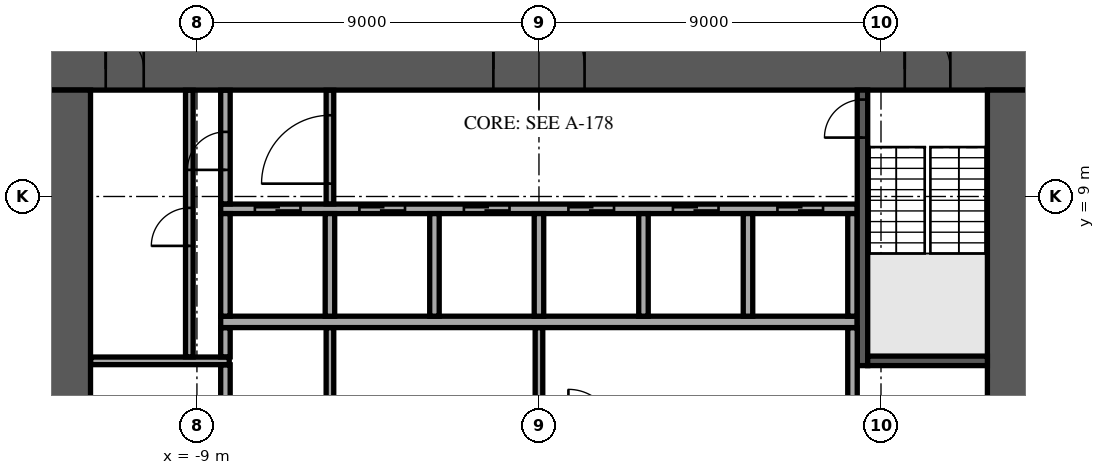
"""IFC4 building model, lengths in metres.
Left out: names, types, materials, properties, quantities, classifications, styles, units other than length and angle.
Written with IfcOpenShell. Run it as: python <this file> out.ifc"""

import sys

from ifc_helpers import new_model, si_unit, direction, frame, frame_2d, origin, place, context, subcontext, project, spatial, rectangle, extrude, element, fill, save


model = new_model("IFC4")
c1 = context("Model", 3, precision=1e-05, world=origin(), true_north=direction((0.0, 1.0)))
c2 = subcontext(c1, "Body", "Model", "MODEL_VIEW")
j1 = project(units=[si_unit("LENGTHUNIT", "METRE"), si_unit("PLANEANGLEUNIT", "RADIAN")], contexts=[c1])
p1 = place(None, origin())
s1 = spatial("IfcSite", under=j1, at=p1, CompositionType="ELEMENT")
p2 = place(p1, origin())
s2 = spatial("IfcBuilding", under=s1, at=p2, CompositionType="ELEMENT")
p3 = place(p2, frame((0.0, 0.0, 102.1)))
s3 = spatial("IfcBuildingStorey", under=s2, at=p3, CompositionType="ELEMENT", Elevation=102.1)
p4 = place(p3, frame((-12.9, 12.35, 0.0), z_axis=(0.0, 0.0, 1.0), x_axis=(1.0, 0.0, 0.0)))
e1 = element("IfcWall", 1, at=p4, inside=s3, PredefinedType="SHEAR", context=c2, shape_type="SweptSolid", body=[
    extrude(rectangle(XDim=25.8, YDim=1.1, at=frame_2d((12.9, 0.0))), origin(), (0.0, 0.0, 1.0), 3.58),
])
p5 = place(p4, frame((11.7, 0.0, 0.0)))
e2 = element("IfcOpeningElement", 2, at=p5, cuts=e1, PredefinedType="OPENING", context=c2, shape_type="SweptSolid", body=[
    extrude(rectangle(XDim=2.4, YDim=2.4, at=frame_2d((1.2, 1.2))), frame((0.0, 0.56, 0.0), z_axis=(0.0, -1.0, 0.0), x_axis=(1.0, 0.0, 0.0)), (0.0, 0.0, 1.0), 1.12),
])
p6 = place(p4, frame((22.525, 0.0, 0.0)))
e3 = element("IfcOpeningElement", 3, at=p6, cuts=e1, PredefinedType="OPENING", context=c2, shape_type="SweptSolid", body=[
    extrude(rectangle(XDim=1.2, YDim=2.1, at=frame_2d((0.6, 1.05))), frame((0.0, 0.56, 0.0), z_axis=(0.0, -1.0, 0.0), x_axis=(1.0, 0.0, 0.0)), (0.0, 0.0, 1.0), 1.12),
])
p7 = place(p4, frame((1.5, 0.0, 0.0)))
e4 = element("IfcOpeningElement", 4, at=p7, cuts=e1, PredefinedType="OPENING", context=c2, shape_type="SweptSolid", body=[
    extrude(rectangle(XDim=1.0, YDim=2.1, at=frame_2d((0.5, 1.05))), frame((0.0, 0.56, 0.0), z_axis=(0.0, -1.0, 0.0), x_axis=(1.0, 0.0, 0.0)), (0.0, 0.0, 1.0), 1.12),
])
p8 = place(p3, frame((12.35, -11.8, 0.0), z_axis=(0.0, 0.0, 1.0), x_axis=(0.0, 1.0, 0.0)))
e5 = element("IfcWall", 5, at=p8, inside=s3, PredefinedType="SHEAR", context=c2, shape_type="SweptSolid", body=[
    extrude(rectangle(XDim=23.6, YDim=1.1, at=frame_2d((11.8, 0.0))), origin(), (0.0, 0.0, 1.0), 3.58),
])
p9 = place(p8, frame((10.6, 0.0, 0.0)))
e6 = element("IfcOpeningElement", 6, at=p9, cuts=e5, PredefinedType="OPENING", context=c2, shape_type="SweptSolid", body=[
    extrude(rectangle(XDim=2.4, YDim=2.4, at=frame_2d((1.2, 1.2))), frame((0.0, 0.56, 0.0), z_axis=(0.0, -1.0, 0.0), x_axis=(1.0, 0.0, 0.0)), (0.0, 0.0, 1.0), 1.12),
])
p10 = place(p3, frame((-12.35, -11.8, 0.0), z_axis=(0.0, 0.0, 1.0), x_axis=(0.0, 1.0, 0.0)))
e7 = element("IfcWall", 7, at=p10, inside=s3, PredefinedType="SHEAR", context=c2, shape_type="SweptSolid", body=[
    extrude(rectangle(XDim=23.6, YDim=1.1, at=frame_2d((11.8, 0.0))), origin(), (0.0, 0.0, 1.0), 3.58),
])
p11 = place(p10, frame((10.6, 0.0, 0.0)))
e8 = element("IfcOpeningElement", 8, at=p11, cuts=e7, PredefinedType="OPENING", context=c2, shape_type="SweptSolid", body=[
    extrude(rectangle(XDim=2.4, YDim=2.4, at=frame_2d((1.2, 1.2))), frame((0.0, 0.56, 0.0), z_axis=(0.0, -1.0, 0.0), x_axis=(1.0, 0.0, 0.0)), (0.0, 0.0, 1.0), 1.12),
])
p12 = place(p3, frame((-8.375, 5.7, 0.0), z_axis=(0.0, 0.0, 1.0), x_axis=(1.0, 0.0, 0.0)))
e9 = element("IfcWall", 9, at=p12, inside=s3, PredefinedType="SOLIDWALL", context=c2, shape_type="SweptSolid", body=[
    extrude(rectangle(XDim=16.75, YDim=0.3, at=frame_2d((8.375, 0.0))), origin(), (0.0, 0.0, 1.0), 3.58),
])
p13 = place(p3, frame((-8.375, 8.675, 0.0), z_axis=(0.0, 0.0, 1.0), x_axis=(1.0, 0.0, 0.0)))
e10 = element("IfcWall", 10, at=p13, inside=s3, PredefinedType="SOLIDWALL", context=c2, shape_type="SweptSolid", body=[
    extrude(rectangle(XDim=16.75, YDim=0.25, at=frame_2d((8.375, 0.0))), origin(), (0.0, 0.0, 1.0), 3.58),
])
p14 = place(p13, frame((0.9, 0.0, 0.0)))
e11 = element("IfcOpeningElement", 11, at=p14, cuts=e10, PredefinedType="OPENING", context=c2, shape_type="SweptSolid", body=[
    extrude(rectangle(XDim=1.2, YDim=2.1, at=frame_2d((0.6, 1.05))), frame((0.0, 0.135, 0.0), z_axis=(0.0, -1.0, 0.0), x_axis=(1.0, 0.0, 0.0)), (0.0, 0.0, 1.0), 0.27),
])
p15 = place(p13, frame((3.65, 0.0, 0.0)))
e12 = element("IfcOpeningElement", 12, at=p15, cuts=e10, PredefinedType="OPENING", context=c2, shape_type="SweptSolid", body=[
    extrude(rectangle(XDim=1.2, YDim=2.1, at=frame_2d((0.6, 1.05))), frame((0.0, 0.135, 0.0), z_axis=(0.0, -1.0, 0.0), x_axis=(1.0, 0.0, 0.0)), (0.0, 0.0, 1.0), 0.27),
])
p16 = place(p13, frame((6.4, 0.0, 0.0)))
e13 = element("IfcOpeningElement", 13, at=p16, cuts=e10, PredefinedType="OPENING", context=c2, shape_type="SweptSolid", body=[
    extrude(rectangle(XDim=1.2, YDim=2.1, at=frame_2d((0.6, 1.05))), frame((0.0, 0.135, 0.0), z_axis=(0.0, -1.0, 0.0), x_axis=(1.0, 0.0, 0.0)), (0.0, 0.0, 1.0), 0.27),
])
p17 = place(p13, frame((9.15, 0.0, 0.0)))
e14 = element("IfcOpeningElement", 14, at=p17, cuts=e10, PredefinedType="OPENING", context=c2, shape_type="SweptSolid", body=[
    extrude(rectangle(XDim=1.2, YDim=2.1, at=frame_2d((0.6, 1.05))), frame((0.0, 0.135, 0.0), z_axis=(0.0, -1.0, 0.0), x_axis=(1.0, 0.0, 0.0)), (0.0, 0.0, 1.0), 0.27),
])
p18 = place(p13, frame((11.9, 0.0, 0.0)))
e15 = element("IfcOpeningElement", 15, at=p18, cuts=e10, PredefinedType="OPENING", context=c2, shape_type="SweptSolid", body=[
    extrude(rectangle(XDim=1.2, YDim=2.1, at=frame_2d((0.6, 1.05))), frame((0.0, 0.135, 0.0), z_axis=(0.0, -1.0, 0.0), x_axis=(1.0, 0.0, 0.0)), (0.0, 0.0, 1.0), 0.27),
])
p19 = place(p13, frame((14.65, 0.0, 0.0)))
e16 = element("IfcOpeningElement", 16, at=p19, cuts=e10, PredefinedType="OPENING", context=c2, shape_type="SweptSolid", body=[
    extrude(rectangle(XDim=1.2, YDim=2.1, at=frame_2d((0.6, 1.05))), frame((0.0, 0.135, 0.0), z_axis=(0.0, -1.0, 0.0), x_axis=(1.0, 0.0, 0.0)), (0.0, 0.0, 1.0), 0.27),
])
for number, where, z_axis, x_axis in (
    (17, (-8.25, 5.85, 0.0), (0.0, 0.0, 1.0), (0.0, 1.0, 0.0)),
    (18, (-5.5, 5.85, 0.0), (0.0, 0.0, 1.0), (0.0, 1.0, 0.0)),
    (19, (-2.75, 5.85, 0.0), (0.0, 0.0, 1.0), (0.0, 1.0, 0.0)),
    (20, (0.0, 5.85, 0.0), (0.0, 0.0, 1.0), (0.0, 1.0, 0.0)),
    (21, (2.75, 5.85, 0.0), (0.0, 0.0, 1.0), (0.0, 1.0, 0.0)),
    (22, (5.5, 5.85, 0.0), (0.0, 0.0, 1.0), (0.0, 1.0, 0.0)),
    (23, (8.25, 5.85, 0.0), (0.0, 0.0, 1.0), (0.0, 1.0, 0.0)),
):
    element("IfcWall", number, at=place(p3, frame(where, z_axis=z_axis, x_axis=x_axis)), inside=s3, PredefinedType="SOLIDWALL", context=c2, shape_type="SweptSolid", body=[
        extrude(rectangle(XDim=2.7, YDim=0.25, at=frame_2d((1.35, 0.0))), origin(), (0.0, 0.0, 1.0), 3.58),
    ])
p20 = place(p3, frame((8.512, 4.55, 0.0), z_axis=(0.0, 0.0, 1.0), x_axis=(0.0, 1.0, 0.0)))
e24 = element("IfcWall", 24, at=p20, inside=s3, PredefinedType="SOLIDWALL", context=c2, shape_type="SweptSolid", body=[
    extrude(rectangle(XDim=7.25, YDim=0.275, at=frame_2d((3.625, 0.0))), origin(), (0.0, 0.0, 1.0), 3.58),
])
p21 = place(p20, frame((6.0, 0.0, 0.0)))
e25 = element("IfcOpeningElement", 25, at=p21, cuts=e24, PredefinedType="OPENING", context=c2, shape_type="SweptSolid", body=[
    extrude(rectangle(XDim=1.0, YDim=2.1, at=frame_2d((0.5, 1.05))), frame((0.0, 0.147, 0.0), z_axis=(0.0, -1.0, 0.0), x_axis=(1.0, 0.0, 0.0)), (0.0, 0.0, 1.0), 0.295),
])
p22 = place(p3, frame((8.65, 4.675, 0.0), z_axis=(0.0, 0.0, 1.0), x_axis=(1.0, 0.0, 0.0)))
e26 = element("IfcWall", 26, at=p22, inside=s3, PredefinedType="SOLIDWALL", context=c2, shape_type="SweptSolid", body=[
    extrude(rectangle(XDim=3.15, YDim=0.25, at=frame_2d((1.575, 0.0))), origin(), (0.0, 0.0, 1.0), 3.58),
])
p23 = place(p3, frame((-8.25, 2.855, 0.0), z_axis=(0.0, 0.0, 1.0), x_axis=(0.0, 1.0, 0.0)))
e27 = element("IfcWall", 27, at=p23, inside=s3, PredefinedType="PARTITIONING", context=c2, shape_type="SweptSolid", body=[
    extrude(rectangle(XDim=1.715, YDim=0.25, at=frame_2d((0.857, 0.0))), origin(), (0.0, 0.0, 1.0), 3.58),
])
for number, where, z_axis, x_axis in (
    (28, (-5.5, 2.855, 0.0), (0.0, 0.0, 1.0), (0.0, 1.0, 0.0)),
    (29, (0.0, 2.855, 0.0), (0.0, 0.0, 1.0), (0.0, 1.0, 0.0)),
):
    element("IfcWall", number, at=place(p3, frame(where, z_axis=z_axis, x_axis=x_axis)), inside=s3, PredefinedType="PARTITIONING", context=c2, shape_type="SweptSolid", body=[
        extrude(rectangle(XDim=2.69, YDim=0.2, at=frame_2d((1.345, 0.0))), origin(), (0.0, 0.0, 1.0), 3.58),
    ])
p24 = place(p3, frame((8.25, 2.855, 0.0), z_axis=(0.0, 0.0, 1.0), x_axis=(0.0, 1.0, 0.0)))
e30 = element("IfcWall", 30, at=p24, inside=s3, PredefinedType="PARTITIONING", context=c2, shape_type="SweptSolid", body=[
    extrude(rectangle(XDim=2.69, YDim=0.25, at=frame_2d((1.345, 0.0))), origin(), (0.0, 0.0, 1.0), 3.58),
])
p25 = place(p3, frame((-11.795, 4.675, 0.0), z_axis=(0.0, 0.0, 1.0), x_axis=(1.0, 0.0, 0.0)))
e31 = element("IfcWall", 31, at=p25, inside=s3, PredefinedType="PARTITIONING", context=c2, shape_type="SweptSolid", body=[
    extrude(rectangle(XDim=3.645, YDim=0.2, at=frame_2d((1.823, 0.0))), origin(), (0.0, 0.0, 1.0), 3.58),
])
p26 = place(p3, frame((-9.2, 4.78, 0.0), z_axis=(0.0, 0.0, 1.0), x_axis=(0.0, 1.0, 0.0)))
e32 = element("IfcWall", 32, at=p26, inside=s3, PredefinedType="PARTITIONING", context=c2, shape_type="SweptSolid", body=[
    extrude(rectangle(XDim=7.015, YDim=0.2, at=frame_2d((3.507, 0.0))), origin(), (0.0, 0.0, 1.0), 3.58),
])
p27 = place(p26, frame((2.92, 0.0, 0.0)))
e33 = element("IfcOpeningElement", 33, at=p27, cuts=e32, PredefinedType="OPENING", context=c2, shape_type="SweptSolid", body=[
    extrude(rectangle(XDim=1.0, YDim=2.1, at=frame_2d((0.5, 1.05))), frame((0.0, 0.11, 0.0), z_axis=(0.0, -1.0, 0.0), x_axis=(1.0, 0.0, 0.0)), (0.0, 0.0, 1.0), 0.22),
])
p28 = place(p3, frame((-8.25, 4.78, 0.0), z_axis=(0.0, 0.0, 1.0), x_axis=(0.0, 1.0, 0.0)))
e34 = element("IfcWall", 34, at=p28, inside=s3, PredefinedType="PARTITIONING", context=c2, shape_type="SweptSolid", body=[
    extrude(rectangle(XDim=0.765, YDim=0.25, at=frame_2d((0.382, 0.0))), origin(), (0.0, 0.0, 1.0), 3.58),
])
p29 = place(p3, frame((-8.25, 8.805, 0.0), z_axis=(0.0, 0.0, 1.0), x_axis=(0.0, 1.0, 0.0)))
e35 = element("IfcWall", 35, at=p29, inside=s3, PredefinedType="PARTITIONING", context=c2, shape_type="SweptSolid", body=[
    extrude(rectangle(XDim=2.99, YDim=0.25, at=frame_2d((1.495, 0.0))), origin(), (0.0, 0.0, 1.0), 3.58),
])
p30 = place(p29, frame((0.895, 0.0, 0.0)))
e36 = element("IfcOpeningElement", 36, at=p30, cuts=e35, PredefinedType="OPENING", context=c2, shape_type="SweptSolid", body=[
    extrude(rectangle(XDim=1.0, YDim=2.1, at=frame_2d((0.5, 1.05))), frame((0.0, 0.135, 0.0), z_axis=(0.0, -1.0, 0.0), x_axis=(1.0, 0.0, 0.0)), (0.0, 0.0, 1.0), 0.27),
])
p31 = place(p3, frame((-5.5, 8.805, 0.0), z_axis=(0.0, 0.0, 1.0), x_axis=(0.0, 1.0, 0.0)))
e37 = element("IfcWall", 37, at=p31, inside=s3, PredefinedType="PARTITIONING", context=c2, shape_type="SweptSolid", body=[
    extrude(rectangle(XDim=2.99, YDim=0.2, at=frame_2d((1.495, 0.0))), origin(), (0.0, 0.0, 1.0), 3.58),
])
p32 = place(p31, frame((0.532, 0.0, 0.0)))
e38 = element("IfcOpeningElement", 38, at=p32, cuts=e37, PredefinedType="OPENING", context=c2, shape_type="SweptSolid", body=[
    extrude(rectangle(XDim=1.8, YDim=2.1, at=frame_2d((0.9, 1.05))), frame((0.0, 0.11, 0.0), z_axis=(0.0, -1.0, 0.0), x_axis=(1.0, 0.0, 0.0)), (0.0, 0.0, 1.0), 0.22),
])
p33 = place(p5, origin())
e39 = element("IfcDoor", 39, at=p33, inside=s3, OperationType="SINGLE_SWING_LEFT", PredefinedType="DOOR", context=c2, shape_type="SweptSolid", body=[
    extrude(rectangle(XDim=2.4, YDim=2.4, at=frame_2d((1.2, 1.2))), frame((0.0, 0.025, 0.0), z_axis=(0.0, -1.0, 0.0), x_axis=(1.0, 0.0, 0.0)), (0.0, 0.0, 1.0), 0.05),
])
fill(e2, e39)
p34 = place(p6, origin())
e40 = element("IfcDoor", 40, at=p34, inside=s3, OperationType="SINGLE_SWING_LEFT", PredefinedType="DOOR", context=c2, shape_type="SweptSolid", body=[
    extrude(rectangle(XDim=1.2, YDim=2.1, at=frame_2d((0.6, 1.05))), frame((0.0, 0.025, 0.0), z_axis=(0.0, -1.0, 0.0), x_axis=(1.0, 0.0, 0.0)), (0.0, 0.0, 1.0), 0.05),
])
fill(e3, e40)
p35 = place(p7, origin())
e41 = element("IfcDoor", 41, at=p35, inside=s3, OperationType="SINGLE_SWING_LEFT", PredefinedType="DOOR", context=c2, shape_type="SweptSolid", body=[
    extrude(rectangle(XDim=1.0, YDim=2.1, at=frame_2d((0.5, 1.05))), frame((0.0, 0.025, 0.0), z_axis=(0.0, -1.0, 0.0), x_axis=(1.0, 0.0, 0.0)), (0.0, 0.0, 1.0), 0.05),
])
fill(e4, e41)
p36 = place(p14, origin())
e42 = element("IfcDoor", 42, at=p36, inside=s3, OperationType="DOUBLE_DOOR_SLIDING", PredefinedType="DOOR", context=c2, shape_type="SweptSolid", body=[
    extrude(rectangle(XDim=1.2, YDim=2.1, at=frame_2d((0.6, 1.05))), frame((0.0, 0.025, 0.0), z_axis=(0.0, -1.0, 0.0), x_axis=(1.0, 0.0, 0.0)), (0.0, 0.0, 1.0), 0.05),
])
fill(e11, e42)
p37 = place(p15, origin())
e43 = element("IfcDoor", 43, at=p37, inside=s3, OperationType="DOUBLE_DOOR_SLIDING", PredefinedType="DOOR", context=c2, shape_type="SweptSolid", body=[
    extrude(rectangle(XDim=1.2, YDim=2.1, at=frame_2d((0.6, 1.05))), frame((0.0, 0.025, 0.0), z_axis=(0.0, -1.0, 0.0), x_axis=(1.0, 0.0, 0.0)), (0.0, 0.0, 1.0), 0.05),
])
fill(e12, e43)
p38 = place(p16, origin())
e44 = element("IfcDoor", 44, at=p38, inside=s3, OperationType="DOUBLE_DOOR_SLIDING", PredefinedType="DOOR", context=c2, shape_type="SweptSolid", body=[
    extrude(rectangle(XDim=1.2, YDim=2.1, at=frame_2d((0.6, 1.05))), frame((0.0, 0.025, 0.0), z_axis=(0.0, -1.0, 0.0), x_axis=(1.0, 0.0, 0.0)), (0.0, 0.0, 1.0), 0.05),
])
fill(e13, e44)
p39 = place(p17, origin())
e45 = element("IfcDoor", 45, at=p39, inside=s3, OperationType="DOUBLE_DOOR_SLIDING", PredefinedType="DOOR", context=c2, shape_type="SweptSolid", body=[
    extrude(rectangle(XDim=1.2, YDim=2.1, at=frame_2d((0.6, 1.05))), frame((0.0, 0.025, 0.0), z_axis=(0.0, -1.0, 0.0), x_axis=(1.0, 0.0, 0.0)), (0.0, 0.0, 1.0), 0.05),
])
fill(e14, e45)
p40 = place(p18, origin())
e46 = element("IfcDoor", 46, at=p40, inside=s3, OperationType="DOUBLE_DOOR_SLIDING", PredefinedType="DOOR", context=c2, shape_type="SweptSolid", body=[
    extrude(rectangle(XDim=1.2, YDim=2.1, at=frame_2d((0.6, 1.05))), frame((0.0, 0.025, 0.0), z_axis=(0.0, -1.0, 0.0), x_axis=(1.0, 0.0, 0.0)), (0.0, 0.0, 1.0), 0.05),
])
fill(e15, e46)
p41 = place(p19, origin())
e47 = element("IfcDoor", 47, at=p41, inside=s3, OperationType="DOUBLE_DOOR_SLIDING", PredefinedType="DOOR", context=c2, shape_type="SweptSolid", body=[
    extrude(rectangle(XDim=1.2, YDim=2.1, at=frame_2d((0.6, 1.05))), frame((0.0, 0.025, 0.0), z_axis=(0.0, -1.0, 0.0), x_axis=(1.0, 0.0, 0.0)), (0.0, 0.0, 1.0), 0.05),
])
fill(e16, e47)
p42 = place(p21, origin())
e48 = element("IfcDoor", 48, at=p42, inside=s3, OperationType="SINGLE_SWING_LEFT", PredefinedType="DOOR", context=c2, shape_type="SweptSolid", body=[
    extrude(rectangle(XDim=1.0, YDim=2.1, at=frame_2d((0.5, 1.05))), frame((0.0, 0.025, 0.0), z_axis=(0.0, -1.0, 0.0), x_axis=(1.0, 0.0, 0.0)), (0.0, 0.0, 1.0), 0.05),
])
fill(e25, e48)
p43 = place(p27, origin())
e49 = element("IfcDoor", 49, at=p43, inside=s3, OperationType="SINGLE_SWING_RIGHT", PredefinedType="DOOR", context=c2, shape_type="SweptSolid", body=[
    extrude(rectangle(XDim=1.0, YDim=2.1, at=frame_2d((0.5, 1.05))), frame((0.0, 0.025, 0.0), z_axis=(0.0, -1.0, 0.0), x_axis=(1.0, 0.0, 0.0)), (0.0, 0.0, 1.0), 0.05),
])
fill(e33, e49)
p44 = place(p30, origin())
e50 = element("IfcDoor", 50, at=p44, inside=s3, OperationType="SINGLE_SWING_RIGHT", PredefinedType="DOOR", context=c2, shape_type="SweptSolid", body=[
    extrude(rectangle(XDim=1.0, YDim=2.1, at=frame_2d((0.5, 1.05))), frame((0.0, 0.025, 0.0), z_axis=(0.0, -1.0, 0.0), x_axis=(1.0, 0.0, 0.0)), (0.0, 0.0, 1.0), 0.05),
])
fill(e36, e50)
p45 = place(p32, origin())
e51 = element("IfcDoor", 51, at=p45, inside=s3, OperationType="SINGLE_SWING_LEFT", PredefinedType="DOOR", context=c2, shape_type="SweptSolid", body=[
    extrude(rectangle(XDim=1.8, YDim=2.1, at=frame_2d((0.9, 1.05))), frame((0.0, 0.025, 0.0), z_axis=(0.0, -1.0, 0.0), x_axis=(1.0, 0.0, 0.0)), (0.0, 0.0, 1.0), 0.05),
])
fill(e38, e51)
save(model, sys.argv[1])
